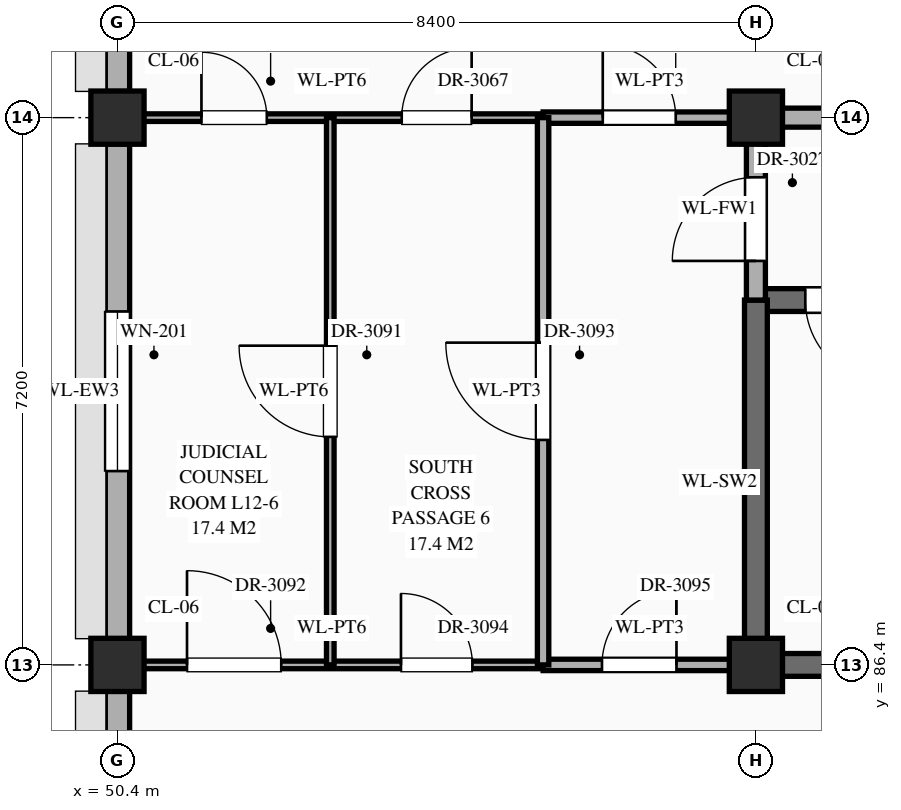
"""IFC4 building model, lengths in metres.
Left out: names, types, materials, properties, quantities, classifications, styles, units other than length and angle.
Written with IfcOpenShell. Run it as: python <this file> out.ifc"""

import sys

from ifc_helpers import new_model, si_unit, direction, frame, frame_2d, origin, origin_2d, place, context, subcontext, project, spatial, rectangle, extrude, element, fill, save


model = new_model("IFC4")
c1 = context("Model", 3, precision=1e-05, world=origin(), true_north=direction((0.0, 1.0)))
c2 = subcontext(c1, "Body", "Model", "MODEL_VIEW")
j1 = project(units=[si_unit("LENGTHUNIT", "METRE"), si_unit("PLANEANGLEUNIT", "RADIAN")], contexts=[c1])
p1 = place(None, origin())
s1 = spatial("IfcSite", under=j1, at=p1, CompositionType="ELEMENT")
p2 = place(p1, origin())
s2 = spatial("IfcBuilding", under=s1, at=p2, CompositionType="ELEMENT")
p3 = place(p2, frame((0.0, 0.0, 51.9)))
s3 = spatial("IfcBuildingStorey", under=s2, at=p3, CompositionType="ELEMENT", Elevation=51.9)
for number, where, z_axis, x_axis in (
    (1, (50.4, 86.4, 0.0), (0.0, 0.0, 1.0), (1.0, 0.0, 0.0)),
    (2, (50.4, 93.6, 0.0), (0.0, 0.0, 1.0), (1.0, 0.0, 0.0)),
    (3, (58.8, 86.4, 0.0), (0.0, 0.0, 1.0), (1.0, 0.0, 0.0)),
    (4, (58.8, 93.6, 0.0), (0.0, 0.0, 1.0), (1.0, 0.0, 0.0)),
):
    element("IfcColumn", number, at=place(p3, frame(where, z_axis=z_axis, x_axis=x_axis)), inside=s3, PredefinedType="COLUMN", context=c2, shape_type="SweptSolid", body=[
        extrude(rectangle(XDim=0.7, YDim=0.7, at=origin_2d()), origin(), (0.0, 0.0, 1.0), 4.2),
    ])
p4 = place(p3, frame((50.4, 79.545, 0.0), z_axis=(0.0, 0.0, 1.0), x_axis=(0.0, 1.0, 0.0)))
e5 = element("IfcWall", 5, at=p4, inside=s3, PredefinedType="STANDARD", context=c2, shape_type="SweptSolid", body=[
    extrude(rectangle(XDim=6.51, YDim=0.32, at=frame_2d((3.255, 0.0))), origin(), (0.0, 0.0, 1.0), 3.31),
])
p5 = place(p4, frame((1.53, 0.0, 0.55)))
e6 = element("IfcOpeningElement", 6, at=p5, cuts=e5, PredefinedType="OPENING", context=c2, shape_type="SweptSolid", body=[
    extrude(rectangle(XDim=1.05, YDim=1.74, at=frame_2d((0.525, 0.87))), frame((0.0, 0.172, 0.0), z_axis=(0.0, -1.0, 0.0), x_axis=(1.0, 0.0, 0.0)), (0.0, 0.0, 1.0), 0.344),
])
p6 = place(p3, frame((50.4, 86.745, 0.0), z_axis=(0.0, 0.0, 1.0), x_axis=(0.0, 1.0, 0.0)))
e7 = element("IfcWall", 7, at=p6, inside=s3, PredefinedType="STANDARD", context=c2, shape_type="SweptSolid", body=[
    extrude(rectangle(XDim=6.51, YDim=0.32, at=frame_2d((3.255, 0.0))), origin(), (0.0, 0.0, 1.0), 3.31),
])
p7 = place(p6, frame((2.205, 0.0, 0.55)))
e8 = element("IfcOpeningElement", 8, at=p7, cuts=e7, PredefinedType="OPENING", context=c2, shape_type="SweptSolid", body=[
    extrude(rectangle(XDim=2.1, YDim=1.92, at=frame_2d((1.05, 0.96))), frame((0.0, 0.172, 0.0), z_axis=(0.0, -1.0, 0.0), x_axis=(1.0, 0.0, 0.0)), (0.0, 0.0, 1.0), 0.344),
])
p8 = place(p3, frame((50.4, 93.945, 0.0), z_axis=(0.0, 0.0, 1.0), x_axis=(0.0, 1.0, 0.0)))
e9 = element("IfcWall", 9, at=p8, inside=s3, PredefinedType="STANDARD", context=c2, shape_type="SweptSolid", body=[
    extrude(rectangle(XDim=6.51, YDim=0.32, at=frame_2d((3.255, 0.0))), origin(), (0.0, 0.0, 1.0), 3.31),
])
p9 = place(p8, frame((3.88, 0.0, 0.55)))
e10 = element("IfcOpeningElement", 10, at=p9, cuts=e9, PredefinedType="OPENING", context=c2, shape_type="SweptSolid", body=[
    extrude(rectangle(XDim=1.35, YDim=2.12, at=frame_2d((0.675, 1.06))), frame((0.0, 0.172, 0.0), z_axis=(0.0, -1.0, 0.0), x_axis=(1.0, 0.0, 0.0)), (0.0, 0.0, 1.0), 0.344),
])
p10 = place(p3, frame((50.44, 86.4, 0.0), z_axis=(0.0, 0.0, 1.0), x_axis=(1.0, 0.0, 0.0)))
e11 = element("IfcWall", 11, at=p10, inside=s3, PredefinedType="STANDARD", context=c2, shape_type="SweptSolid", body=[
    extrude(rectangle(XDim=5.56, YDim=0.1, at=frame_2d((2.78, 0.0))), origin(), (0.0, 0.0, 1.0), 3.11),
])
p11 = place(p10, frame((0.875, 0.0, 0.0)))
e12 = element("IfcOpeningElement", 12, at=p11, cuts=e11, PredefinedType="OPENING", context=c2, shape_type="SweptSolid", body=[
    extrude(rectangle(XDim=1.24, YDim=2.3, at=frame_2d((0.62, 1.15))), frame((0.0, 0.062, 0.0), z_axis=(0.0, -1.0, 0.0), x_axis=(1.0, 0.0, 0.0)), (0.0, 0.0, 1.0), 0.124),
])
p12 = place(p10, frame((3.69, 0.0, 0.0)))
e13 = element("IfcOpeningElement", 13, at=p12, cuts=e11, PredefinedType="OPENING", context=c2, shape_type="SweptSolid", body=[
    extrude(rectangle(XDim=0.94, YDim=2.3, at=frame_2d((0.47, 1.15))), frame((0.0, 0.062, 0.0), z_axis=(0.0, -1.0, 0.0), x_axis=(1.0, 0.0, 0.0)), (0.0, 0.0, 1.0), 0.124),
])
p13 = place(p3, frame((56.0, 86.4, 0.0), z_axis=(0.0, 0.0, 1.0), x_axis=(1.0, 0.0, 0.0)))
e14 = element("IfcWall", 14, at=p13, inside=s3, PredefinedType="STANDARD", context=c2, shape_type="SweptSolid", body=[
    extrude(rectangle(XDim=2.8, YDim=0.15, at=frame_2d((1.4, 0.0))), origin(), (0.0, 0.0, 1.0), 3.11),
])
p14 = place(p13, frame((0.775, 0.0, 0.0)))
e15 = element("IfcOpeningElement", 15, at=p14, cuts=e14, PredefinedType="OPENING", context=c2, shape_type="SweptSolid", body=[
    extrude(rectangle(XDim=0.98, YDim=2.35, at=frame_2d((0.49, 1.175))), frame((0.0, 0.087, 0.0), z_axis=(0.0, -1.0, 0.0), x_axis=(1.0, 0.0, 0.0)), (0.0, 0.0, 1.0), 0.174),
])
p15 = place(p3, frame((58.8, 86.4, 0.0), z_axis=(0.0, 0.0, 1.0), x_axis=(1.0, 0.0, 0.0)))
e16 = element("IfcWall", 16, at=p15, inside=s3, PredefinedType="SHEAR", context=c2, shape_type="SweptSolid", body=[
    extrude(rectangle(XDim=8.4, YDim=0.3, at=frame_2d((4.2, 0.0))), origin(), (0.0, 0.0, 1.0), 3.96),
])
p16 = place(p3, frame((58.8, 91.2, 0.0), z_axis=(0.0, 0.0, 1.0), x_axis=(1.0, 0.0, 0.0)))
e17 = element("IfcWall", 17, at=p16, inside=s3, PredefinedType="SHEAR", context=c2, shape_type="SweptSolid", body=[
    extrude(rectangle(XDim=8.4, YDim=0.3, at=frame_2d((4.2, 0.0))), origin(), (0.0, 0.0, 1.0), 3.96),
])
p17 = place(p16, frame((0.65, 0.0, 0.0)))
e18 = element("IfcOpeningElement", 18, at=p17, cuts=e17, PredefinedType="OPENING", context=c2, shape_type="SweptSolid", body=[
    extrude(rectangle(XDim=1.1, YDim=2.2, at=frame_2d((0.55, 1.1))), frame((0.0, 0.162, 0.0), z_axis=(0.0, -1.0, 0.0), x_axis=(1.0, 0.0, 0.0)), (0.0, 0.0, 1.0), 0.324),
])
p18 = place(p3, frame((50.44, 93.6, 0.0), z_axis=(0.0, 0.0, 1.0), x_axis=(1.0, 0.0, 0.0)))
e19 = element("IfcWall", 19, at=p18, inside=s3, PredefinedType="STANDARD", context=c2, shape_type="SweptSolid", body=[
    extrude(rectangle(XDim=5.56, YDim=0.1, at=frame_2d((2.78, 0.0))), origin(), (0.0, 0.0, 1.0), 3.11),
])
p19 = place(p18, frame((1.065, 0.0, 0.0)))
e20 = element("IfcOpeningElement", 20, at=p19, cuts=e19, PredefinedType="OPENING", context=c2, shape_type="SweptSolid", body=[
    extrude(rectangle(XDim=0.86, YDim=2.1, at=frame_2d((0.43, 1.05))), frame((0.0, 0.062, 0.0), z_axis=(0.0, -1.0, 0.0), x_axis=(1.0, 0.0, 0.0)), (0.0, 0.0, 1.0), 0.124),
])
p20 = place(p18, frame((3.7, 0.0, 0.0)))
e21 = element("IfcOpeningElement", 21, at=p20, cuts=e19, PredefinedType="OPENING", context=c2, shape_type="SweptSolid", body=[
    extrude(rectangle(XDim=0.92, YDim=2.15, at=frame_2d((0.46, 1.075))), frame((0.0, 0.062, 0.0), z_axis=(0.0, -1.0, 0.0), x_axis=(1.0, 0.0, 0.0)), (0.0, 0.0, 1.0), 0.124),
])
p21 = place(p3, frame((56.0, 93.6, 0.0), z_axis=(0.0, 0.0, 1.0), x_axis=(1.0, 0.0, 0.0)))
e22 = element("IfcWall", 22, at=p21, inside=s3, PredefinedType="STANDARD", context=c2, shape_type="SweptSolid", body=[
    extrude(rectangle(XDim=2.8, YDim=0.15, at=frame_2d((1.4, 0.0))), origin(), (0.0, 0.0, 1.0), 3.11),
])
p22 = place(p21, frame((0.785, 0.0, 0.0)))
e23 = element("IfcOpeningElement", 23, at=p22, cuts=e22, PredefinedType="OPENING", context=c2, shape_type="SweptSolid", body=[
    extrude(rectangle(XDim=0.96, YDim=2.2, at=frame_2d((0.48, 1.1))), frame((0.0, 0.087, 0.0), z_axis=(0.0, -1.0, 0.0), x_axis=(1.0, 0.0, 0.0)), (0.0, 0.0, 1.0), 0.174),
])
p23 = place(p3, frame((58.8, 93.6, 0.0), z_axis=(0.0, 0.0, 1.0), x_axis=(1.0, 0.0, 0.0)))
e24 = element("IfcWall", 24, at=p23, inside=s3, PredefinedType="STANDARD", context=c2, shape_type="SweptSolid", body=[
    extrude(rectangle(XDim=8.4, YDim=0.25, at=frame_2d((4.2, 0.0))), origin(), (0.0, 0.0, 1.0), 3.11),
])
p24 = place(p23, frame((3.45, 0.0, 0.0)))
e25 = element("IfcOpeningElement", 25, at=p24, cuts=e24, PredefinedType="OPENING", context=c2, shape_type="SweptSolid", body=[
    extrude(rectangle(XDim=1.5, YDim=2.25, at=frame_2d((0.75, 1.125))), frame((0.0, 0.137, 0.0), z_axis=(0.0, -1.0, 0.0), x_axis=(1.0, 0.0, 0.0)), (0.0, 0.0, 1.0), 0.274),
])
p25 = place(p3, frame((53.2, 86.4, 0.0), z_axis=(0.0, 0.0, 1.0), x_axis=(0.0, 1.0, 0.0)))
e26 = element("IfcWall", 26, at=p25, inside=s3, PredefinedType="STANDARD", context=c2, shape_type="SweptSolid", body=[
    extrude(rectangle(XDim=7.2, YDim=0.1, at=frame_2d((3.6, 0.0))), origin(), (0.0, 0.0, 1.0), 3.96),
])
p26 = place(p25, frame((3.0, 0.0, 0.0)))
e27 = element("IfcOpeningElement", 27, at=p26, cuts=e26, PredefinedType="OPENING", context=c2, shape_type="SweptSolid", body=[
    extrude(rectangle(XDim=1.2, YDim=2.35, at=frame_2d((0.6, 1.175))), frame((0.0, 0.062, 0.0), z_axis=(0.0, -1.0, 0.0), x_axis=(1.0, 0.0, 0.0)), (0.0, 0.0, 1.0), 0.124),
])
p27 = place(p3, frame((56.0, 86.4, 0.0), z_axis=(0.0, 0.0, 1.0), x_axis=(0.0, 1.0, 0.0)))
e28 = element("IfcWall", 28, at=p27, inside=s3, PredefinedType="STANDARD", context=c2, shape_type="SweptSolid", body=[
    extrude(rectangle(XDim=7.2, YDim=0.15, at=frame_2d((3.6, 0.0))), origin(), (0.0, 0.0, 1.0), 3.96),
])
p28 = place(p27, frame((2.96, 0.0, 0.0)))
e29 = element("IfcOpeningElement", 29, at=p28, cuts=e28, PredefinedType="OPENING", context=c2, shape_type="SweptSolid", body=[
    extrude(rectangle(XDim=1.28, YDim=2.35, at=frame_2d((0.64, 1.175))), frame((0.0, 0.087, 0.0), z_axis=(0.0, -1.0, 0.0), x_axis=(1.0, 0.0, 0.0)), (0.0, 0.0, 1.0), 0.174),
])
p29 = place(p3, frame((58.8, 86.4, 0.0), z_axis=(0.0, 0.0, 1.0), x_axis=(0.0, 1.0, 0.0)))
e30 = element("IfcWall", 30, at=p29, inside=s3, PredefinedType="SHEAR", context=c2, shape_type="SweptSolid", body=[
    extrude(rectangle(XDim=4.8, YDim=0.3, at=frame_2d((2.4, 0.0))), origin(), (0.0, 0.0, 1.0), 3.96),
])
p30 = place(p3, frame((58.8, 91.2, 0.0), z_axis=(0.0, 0.0, 1.0), x_axis=(0.0, 1.0, 0.0)))
e31 = element("IfcWall", 31, at=p30, inside=s3, PredefinedType="STANDARD", context=c2, shape_type="SweptSolid", body=[
    extrude(rectangle(XDim=2.4, YDim=0.25, at=frame_2d((1.2, 0.0))), origin(), (0.0, 0.0, 1.0), 3.21),
])
p31 = place(p30, frame((0.515, 0.0, 0.0)))
e32 = element("IfcOpeningElement", 32, at=p31, cuts=e31, PredefinedType="OPENING", context=c2, shape_type="SweptSolid", body=[
    extrude(rectangle(XDim=1.1, YDim=2.2, at=frame_2d((0.55, 1.1))), frame((0.0, 0.137, 0.0), z_axis=(0.0, -1.0, 0.0), x_axis=(1.0, 0.0, 0.0)), (0.0, 0.0, 1.0), 0.274),
])
p32 = place(p7, origin())
e33 = element("IfcWindow", 33, at=p32, inside=s3, PartitioningType="SINGLE_PANEL", PredefinedType="WINDOW", context=c2, shape_type="SweptSolid", body=[
    extrude(rectangle(XDim=2.1, YDim=1.92, at=frame_2d((1.05, 0.96))), frame((0.0, 0.03, 0.0), z_axis=(0.0, -1.0, 0.0), x_axis=(1.0, 0.0, 0.0)), (0.0, 0.0, 1.0), 0.06),
])
fill(e8, e33)
p33 = place(p17, frame((1.1, 0.0, 0.0), z_axis=(0.0, 0.0, 1.0), x_axis=(-1.0, 0.0, 0.0)))
e34 = element("IfcDoor", 34, at=p33, inside=s3, OperationType="SINGLE_SWING_LEFT", PredefinedType="DOOR", context=c2, shape_type="SweptSolid", body=[
    extrude(rectangle(XDim=1.1, YDim=2.2, at=frame_2d((0.55, 1.1))), frame((0.0, 0.025, 0.0), z_axis=(0.0, -1.0, 0.0), x_axis=(1.0, 0.0, 0.0)), (0.0, 0.0, 1.0), 0.05),
])
fill(e18, e34)
p34 = place(p31, origin())
e35 = element("IfcDoor", 35, at=p34, inside=s3, OperationType="SINGLE_SWING_LEFT", PredefinedType="DOOR", context=c2, shape_type="SweptSolid", body=[
    extrude(rectangle(XDim=1.1, YDim=2.2, at=frame_2d((0.55, 1.1))), frame((0.0, 0.025, 0.0), z_axis=(0.0, -1.0, 0.0), x_axis=(1.0, 0.0, 0.0)), (0.0, 0.0, 1.0), 0.05),
])
fill(e32, e35)
p35 = place(p19, origin())
e36 = element("IfcDoor", 36, at=p35, inside=s3, OperationType="SINGLE_SWING_LEFT", PredefinedType="DOOR", context=c2, shape_type="SweptSolid", body=[
    extrude(rectangle(XDim=0.86, YDim=2.1, at=frame_2d((0.43, 1.05))), frame((0.0, 0.025, 0.0), z_axis=(0.0, -1.0, 0.0), x_axis=(1.0, 0.0, 0.0)), (0.0, 0.0, 1.0), 0.05),
])
fill(e20, e36)
p36 = place(p20, origin())
e37 = element("IfcDoor", 37, at=p36, inside=s3, OperationType="SINGLE_SWING_RIGHT", PredefinedType="DOOR", context=c2, shape_type="SweptSolid", body=[
    extrude(rectangle(XDim=0.92, YDim=2.15, at=frame_2d((0.46, 1.075))), frame((0.0, 0.025, 0.0), z_axis=(0.0, -1.0, 0.0), x_axis=(1.0, 0.0, 0.0)), (0.0, 0.0, 1.0), 0.05),
])
fill(e21, e37)
p37 = place(p22, origin())
e38 = element("IfcDoor", 38, at=p37, inside=s3, OperationType="SINGLE_SWING_LEFT", PredefinedType="DOOR", context=c2, shape_type="SweptSolid", body=[
    extrude(rectangle(XDim=0.96, YDim=2.2, at=frame_2d((0.48, 1.1))), frame((0.0, 0.025, 0.0), z_axis=(0.0, -1.0, 0.0), x_axis=(1.0, 0.0, 0.0)), (0.0, 0.0, 1.0), 0.05),
])
fill(e23, e38)
p38 = place(p26, origin())
e39 = element("IfcDoor", 39, at=p38, inside=s3, OperationType="SINGLE_SWING_RIGHT", PredefinedType="DOOR", context=c2, shape_type="SweptSolid", body=[
    extrude(rectangle(XDim=1.2, YDim=2.35, at=frame_2d((0.6, 1.175))), frame((0.0, 0.025, 0.0), z_axis=(0.0, -1.0, 0.0), x_axis=(1.0, 0.0, 0.0)), (0.0, 0.0, 1.0), 0.05),
])
fill(e27, e39)
p39 = place(p11, origin())
e40 = element("IfcDoor", 40, at=p39, inside=s3, OperationType="SINGLE_SWING_LEFT", PredefinedType="DOOR", context=c2, shape_type="SweptSolid", body=[
    extrude(rectangle(XDim=1.24, YDim=2.3, at=frame_2d((0.62, 1.15))), frame((0.0, 0.025, 0.0), z_axis=(0.0, -1.0, 0.0), x_axis=(1.0, 0.0, 0.0)), (0.0, 0.0, 1.0), 0.05),
])
fill(e12, e40)
p40 = place(p28, origin())
e41 = element("IfcDoor", 41, at=p40, inside=s3, OperationType="SINGLE_SWING_RIGHT", PredefinedType="DOOR", context=c2, shape_type="SweptSolid", body=[
    extrude(rectangle(XDim=1.28, YDim=2.35, at=frame_2d((0.64, 1.175))), frame((0.0, 0.025, 0.0), z_axis=(0.0, -1.0, 0.0), x_axis=(1.0, 0.0, 0.0)), (0.0, 0.0, 1.0), 0.05),
])
fill(e29, e41)
p41 = place(p12, origin())
e42 = element("IfcDoor", 42, at=p41, inside=s3, OperationType="SINGLE_SWING_LEFT", PredefinedType="DOOR", context=c2, shape_type="SweptSolid", body=[
    extrude(rectangle(XDim=0.94, YDim=2.3, at=frame_2d((0.47, 1.15))), frame((0.0, 0.025, 0.0), z_axis=(0.0, -1.0, 0.0), x_axis=(1.0, 0.0, 0.0)), (0.0, 0.0, 1.0), 0.05),
])
fill(e13, e42)
p42 = place(p14, origin())
e43 = element("IfcDoor", 43, at=p42, inside=s3, OperationType="SINGLE_SWING_RIGHT", PredefinedType="DOOR", context=c2, shape_type="SweptSolid", body=[
    extrude(rectangle(XDim=0.98, YDim=2.35, at=frame_2d((0.49, 1.175))), frame((0.0, 0.025, 0.0), z_axis=(0.0, -1.0, 0.0), x_axis=(1.0, 0.0, 0.0)), (0.0, 0.0, 1.0), 0.05),
])
fill(e15, e43)
save(model, sys.argv[1])
